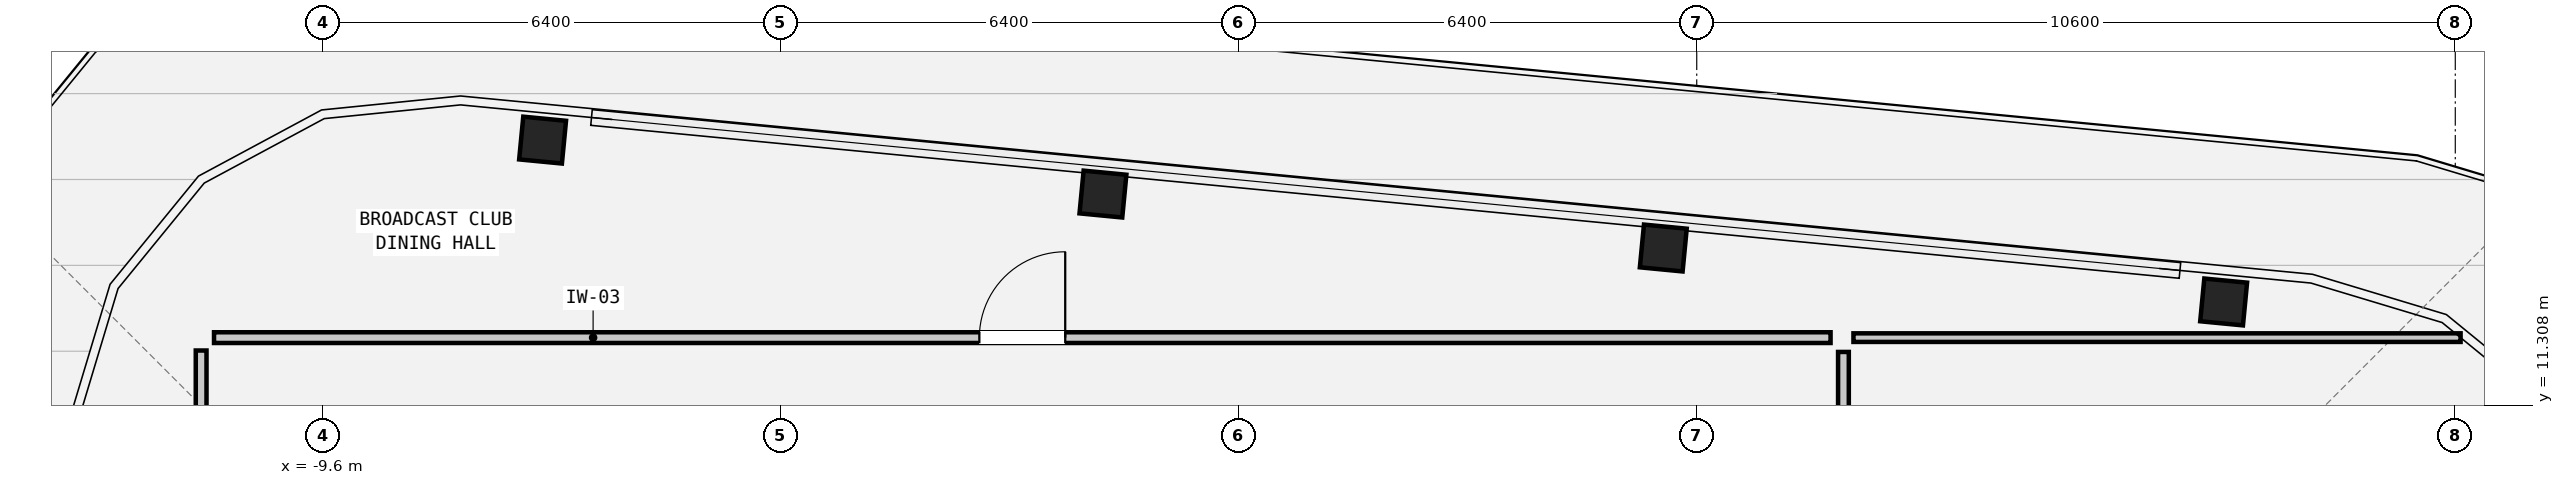
"""IFC4 building model, lengths in metres.
Left out: names, types, materials, properties, quantities, classifications, styles, units other than length and angle.
Written with IfcOpenShell. Run it as: python <this file> out.ifc"""

import sys

from ifc_helpers import new_model, si_unit, direction, frame, frame_2d, origin, origin_2d, place, context, subcontext, project, spatial, rectangle, hollow_rectangle, extrude, element, fill, save


model = new_model("IFC4")
c1 = context("Model", 3, precision=1e-05, world=origin(), true_north=direction((0.0, 1.0)))
c2 = subcontext(c1, "Body", "Model", "MODEL_VIEW")
j1 = project(units=[si_unit("LENGTHUNIT", "METRE"), si_unit("PLANEANGLEUNIT", "RADIAN")], contexts=[c1])
p1 = place(None, origin())
s1 = spatial("IfcSite", under=j1, at=p1, CompositionType="ELEMENT")
p2 = place(p1, origin())
s2 = spatial("IfcBuilding", under=s1, at=p2, CompositionType="ELEMENT")
p3 = place(p2, frame((0.0, 0.0, 276.95)))
s3 = spatial("IfcBuildingStorey", under=s2, at=p3, CompositionType="ELEMENT", Elevation=276.95)
for number, where, z_axis, x_axis in (
    (1, (16.963, 12.749, 0.0), (0.0, 0.0, 1.0), (0.995, -0.096, 0.0)),
    (2, (9.133, 13.502, 0.0), (0.0, 0.0, 1.0), (0.995, -0.096, 0.0)),
    (3, (1.302, 14.256, 0.0), (0.0, 0.0, 1.0), (0.995, -0.096, 0.0)),
    (4, (-6.528, 15.01, 0.0), (0.0, 0.0, 1.0), (0.995, -0.096, 0.0)),
):
    element("IfcColumn", number, at=place(p3, frame(where, z_axis=z_axis, x_axis=x_axis)), inside=s3, PredefinedType="COLUMN", context=c2, shape_type="SweptSolid", body=[
        extrude(hollow_rectangle(XDim=0.6, YDim=0.6, WallThickness=0.04, at=origin_2d()), origin(), (0.0, 0.0, 1.0), 3.6),
    ])
p4 = place(p3, frame((11.79, 12.25, 0.0), z_axis=(0.0, 0.0, 1.0), x_axis=(1.0, 0.0, 0.0)))
e5 = element("IfcWall", 5, at=p4, inside=s3, PredefinedType="PARTITIONING", context=c2, shape_type="SweptSolid", body=[
    extrude(rectangle(XDim=8.484, YDim=0.12, at=frame_2d((4.242, 0.0))), origin(), (0.0, 0.0, 1.0), 3.41),
])
p5 = place(p3, frame((-11.12, 12.25, 0.0), z_axis=(0.0, 0.0, 1.0), x_axis=(1.0, 0.0, 0.0)))
e6 = element("IfcWall", 6, at=p5, inside=s3, PredefinedType="PARTITIONING", context=c2, shape_type="SweptSolid", body=[
    extrude(rectangle(XDim=22.59, YDim=0.15, at=frame_2d((11.295, 0.0))), origin(), (0.0, 0.0, 1.0), 3.41),
])
p6 = place(p5, frame((10.695, 0.0, 0.0)))
e7 = element("IfcOpeningElement", 7, at=p6, cuts=e6, PredefinedType="OPENING", context=c2, shape_type="SweptSolid", body=[
    extrude(rectangle(XDim=1.2, YDim=2.1, at=frame_2d((0.6, 1.05))), frame((0.0, 0.087, 0.0), z_axis=(0.0, -1.0, 0.0), x_axis=(1.0, 0.0, 0.0)), (0.0, 0.0, 1.0), 0.174),
])
p7 = place(p3, frame((-11.3, 0.18, 0.0), z_axis=(0.0, 0.0, 1.0), x_axis=(0.0, 1.0, 0.0)))
e8 = element("IfcWall", 8, at=p7, inside=s3, PredefinedType="PARTITIONING", context=c2, shape_type="SweptSolid", body=[
    extrude(rectangle(XDim=11.89, YDim=0.15, at=frame_2d((5.945, 0.0))), origin(), (0.0, 0.0, 1.0), 3.41),
])
p8 = place(p7, frame((5.47, 0.0, 0.0)))
e9 = element("IfcOpeningElement", 9, at=p8, cuts=e8, PredefinedType="OPENING", context=c2, shape_type="SweptSolid", body=[
    extrude(rectangle(XDim=0.95, YDim=2.1, at=frame_2d((0.475, 1.05))), frame((0.0, 0.087, 0.0), z_axis=(0.0, -1.0, 0.0), x_axis=(1.0, 0.0, 0.0)), (0.0, 0.0, 1.0), 0.174),
])
p9 = place(p3, frame((11.65, 3.8, 0.0), z_axis=(0.0, 0.0, 1.0), x_axis=(0.0, 1.0, 0.0)))
e10 = element("IfcWall", 10, at=p9, inside=s3, PredefinedType="PARTITIONING", context=c2, shape_type="SweptSolid", body=[
    extrude(rectangle(XDim=8.25, YDim=0.15, at=frame_2d((4.125, 0.0))), origin(), (0.0, 0.0, 1.0), 3.41),
])
p10 = place(p9, frame((3.525, 0.0, 0.0)))
e11 = element("IfcOpeningElement", 11, at=p10, cuts=e10, PredefinedType="OPENING", context=c2, shape_type="SweptSolid", body=[
    extrude(rectangle(XDim=1.2, YDim=2.1, at=frame_2d((0.6, 1.05))), frame((0.0, 0.087, 0.0), z_axis=(0.0, -1.0, 0.0), x_axis=(1.0, 0.0, 0.0)), (0.0, 0.0, 1.0), 0.174),
])
p11 = place(p6, origin())
e12 = element("IfcDoor", 12, at=p11, inside=s3, OperationType="SINGLE_SWING_RIGHT", PredefinedType="DOOR", context=c2, shape_type="SweptSolid", body=[
    extrude(rectangle(XDim=1.2, YDim=2.1, at=frame_2d((0.6, 1.05))), frame((0.0, 0.025, 0.0), z_axis=(0.0, -1.0, 0.0), x_axis=(1.0, 0.0, 0.0)), (0.0, 0.0, 1.0), 0.05),
])
fill(e7, e12)
save(model, sys.argv[1])
